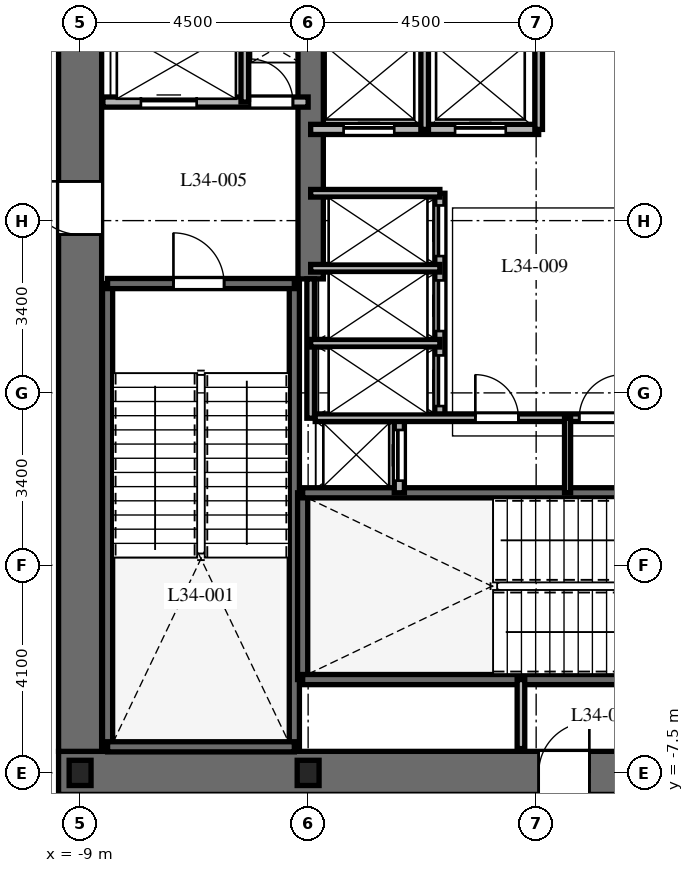
"""IFC4 building model, lengths in metres.
Left out: names, types, materials, properties, quantities, classifications, styles, units other than length and angle.
Written with IfcOpenShell. Run it as: python <this file> out.ifc"""

import sys

from ifc_helpers import new_model, si_unit, direction, frame, frame_2d, origin, origin_2d, place, context, subcontext, project, spatial, rectangle, i_section, extrude, element, fill, save


model = new_model("IFC4")
c1 = context("Model", 3, precision=1e-05, world=origin(), true_north=direction((0.0, 1.0)))
c2 = subcontext(c1, "Body", "Model", "MODEL_VIEW")
j1 = project(units=[si_unit("LENGTHUNIT", "METRE"), si_unit("PLANEANGLEUNIT", "RADIAN")], contexts=[c1])
p1 = place(None, origin())
s1 = spatial("IfcSite", under=j1, at=p1, CompositionType="ELEMENT")
p2 = place(p1, origin())
s2 = spatial("IfcBuilding", under=s1, at=p2, CompositionType="ELEMENT")
p3 = place(p2, frame((0.0, 0.0, 139.5)))
s3 = spatial("IfcBuildingStorey", under=s2, at=p3, CompositionType="ELEMENT", Elevation=139.5)
p4 = place(p3, frame((-9.425, -7.5, 0.0), z_axis=(0.0, 0.0, 1.0), x_axis=(1.0, 0.0, 0.0)))
e1 = element("IfcWall", 1, at=p4, inside=s3, PredefinedType="SHEAR", context=c2, shape_type="SweptSolid", body=[
    extrude(rectangle(XDim=18.85, YDim=0.85, at=frame_2d((9.425, 0.0))), origin(), (0.0, 0.0, 1.0), 4.8),
])
p5 = place(p4, frame((9.475, 0.0, 0.0)))
e2 = element("IfcOpeningElement", 2, at=p5, cuts=e1, PredefinedType="OPENING", context=c2, shape_type="SweptSolid", body=[
    extrude(rectangle(XDim=1.0, YDim=2.15, at=frame_2d((0.5, 1.075))), frame((0.0, 0.435, 0.0), z_axis=(0.0, -1.0, 0.0), x_axis=(1.0, 0.0, 0.0)), (0.0, 0.0, 1.0), 0.87),
])
p6 = place(p3, frame((-9.0, -7.075, 0.0), z_axis=(0.0, 0.0, 1.0), x_axis=(0.0, 1.0, 0.0)))
e3 = element("IfcWall", 3, at=p6, inside=s3, PredefinedType="SHEAR", context=c2, shape_type="SweptSolid", body=[
    extrude(rectangle(XDim=14.15, YDim=0.85, at=frame_2d((7.075, 0.0))), origin(), (0.0, 0.0, 1.0), 4.8),
])
p7 = place(p6, frame((10.2, 0.0, 0.0)))
e4 = element("IfcOpeningElement", 4, at=p7, cuts=e3, PredefinedType="OPENING", context=c2, shape_type="SweptSolid", body=[
    extrude(rectangle(XDim=1.05, YDim=2.15, at=frame_2d((0.525, 1.075))), frame((0.0, 0.435, 0.0), z_axis=(0.0, -1.0, 0.0), x_axis=(1.0, 0.0, 0.0)), (0.0, 0.0, 1.0), 0.87),
])
p8 = place(p3, frame((-4.45, 2.25, 0.0), z_axis=(0.0, 0.0, 1.0), x_axis=(0.0, 1.0, 0.0)))
e5 = element("IfcWall", 5, at=p8, inside=s3, PredefinedType="SHEAR", context=c2, shape_type="SweptSolid", body=[
    extrude(rectangle(XDim=4.825, YDim=0.5, at=frame_2d((2.413, 0.0))), origin(), (0.0, 0.0, 1.0), 4.8),
])
for number, where, z_axis, x_axis in (
    (6, (-8.458, -6.985, 0.0), (0.0, 0.0, 1.0), (0.0, 1.0, 0.0)),
    (7, (-4.772, -6.985, 0.0), (0.0, 0.0, 1.0), (0.0, 1.0, 0.0)),
):
    element("IfcWall", number, at=place(p3, frame(where, z_axis=z_axis, x_axis=x_axis)), inside=s3, PredefinedType="SHEAR", context=c2, shape_type="SweptSolid", body=[
        extrude(rectangle(XDim=9.143, YDim=0.2, at=frame_2d((4.572, 0.0))), origin(), (0.0, 0.0, 1.0), 4.8),
    ])
p9 = place(p3, frame((-8.458, -6.985, 0.0), z_axis=(0.0, 0.0, 1.0), x_axis=(1.0, 0.0, 0.0)))
e8 = element("IfcWall", 8, at=p9, inside=s3, PredefinedType="SHEAR", context=c2, shape_type="SweptSolid", body=[
    extrude(rectangle(XDim=3.686, YDim=0.2, at=frame_2d((1.843, 0.0))), origin(), (0.0, 0.0, 1.0), 4.8),
])
p10 = place(p3, frame((-8.458, 2.158, 0.0), z_axis=(0.0, 0.0, 1.0), x_axis=(1.0, 0.0, 0.0)))
e9 = element("IfcWall", 9, at=p10, inside=s3, PredefinedType="SHEAR", context=c2, shape_type="SweptSolid", body=[
    extrude(rectangle(XDim=3.686, YDim=0.2, at=frame_2d((1.843, 0.0))), origin(), (0.0, 0.0, 1.0), 4.8),
])
p11 = place(p10, frame((1.3, 0.0, 0.0)))
e10 = element("IfcOpeningElement", 10, at=p11, cuts=e9, PredefinedType="OPENING", context=c2, shape_type="SweptSolid", body=[
    extrude(rectangle(XDim=1.0, YDim=2.15, at=frame_2d((0.5, 1.075))), frame((0.0, 0.11, 0.0), z_axis=(0.0, -1.0, 0.0), x_axis=(1.0, 0.0, 0.0)), (0.0, 0.0, 1.0), 0.22),
])
p12 = place(p3, frame((-4.608, -5.658, 0.0), z_axis=(0.0, 0.0, 1.0), x_axis=(0.0, 1.0, 0.0)))
e11 = element("IfcWall", 11, at=p12, inside=s3, PredefinedType="SHEAR", context=c2, shape_type="SweptSolid", body=[
    extrude(rectangle(XDim=3.686, YDim=0.2, at=frame_2d((1.843, 0.0))), origin(), (0.0, 0.0, 1.0), 4.8),
])
p13 = place(p3, frame((-4.608, -5.658, 0.0), z_axis=(0.0, 0.0, 1.0), x_axis=(1.0, 0.0, 0.0)))
e12 = element("IfcWall", 12, at=p13, inside=s3, PredefinedType="SHEAR", context=c2, shape_type="SweptSolid", body=[
    extrude(rectangle(XDim=9.166, YDim=0.2, at=frame_2d((4.583, 0.0))), origin(), (0.0, 0.0, 1.0), 4.8),
])
p14 = place(p13, frame((7.45, 0.0, 0.0)))
e13 = element("IfcOpeningElement", 13, at=p14, cuts=e12, PredefinedType="OPENING", context=c2, shape_type="SweptSolid", body=[
    extrude(rectangle(XDim=1.0, YDim=2.15, at=frame_2d((0.5, 1.075))), frame((0.0, 0.11, 0.0), z_axis=(0.0, -1.0, 0.0), x_axis=(1.0, 0.0, 0.0)), (0.0, 0.0, 1.0), 0.22),
])
p15 = place(p3, frame((-4.608, -1.972, 0.0), z_axis=(0.0, 0.0, 1.0), x_axis=(1.0, 0.0, 0.0)))
e14 = element("IfcWall", 14, at=p15, inside=s3, PredefinedType="SHEAR", context=c2, shape_type="SweptSolid", body=[
    extrude(rectangle(XDim=9.166, YDim=0.2, at=frame_2d((4.583, 0.0))), origin(), (0.0, 0.0, 1.0), 4.8),
])
for number, where, z_axis, x_axis in (
    (15, (-9.0, -7.5, 0.0), (0.0, 0.0, 1.0), (1.0, 0.0, 0.0)),
    (16, (-4.5, -7.5, 0.0), (0.0, 0.0, 1.0), (1.0, 0.0, 0.0)),
):
    element("IfcColumn", number, at=place(p3, frame(where, z_axis=z_axis, x_axis=x_axis)), inside=s3, PredefinedType="COLUMN", context=c2, shape_type="SweptSolid", body=[
        extrude(i_section(OverallWidth=0.432, OverallDepth=0.498, WebThickness=0.056, FlangeThickness=0.089, at=origin_2d()), origin(), (0.0, 0.0, 1.0), 4.8),
    ])
p16 = place(p3, frame((-0.3, -7.02, 0.0), z_axis=(0.0, 0.0, 1.0), x_axis=(0.0, 1.0, 0.0)))
e17 = element("IfcWall", 17, at=p16, inside=s3, PredefinedType="PARTITIONING", context=c2, shape_type="SweptSolid", body=[
    extrude(rectangle(XDim=1.362, YDim=0.15, at=frame_2d((0.681, 0.0))), origin(), (0.0, 0.0, 1.0), 4.5),
])
p17 = place(p3, frame((-8.55, 5.74, 0.0), z_axis=(0.0, 0.0, 1.0), x_axis=(1.0, 0.0, 0.0)))
e18 = element("IfcWall", 18, at=p17, inside=s3, PredefinedType="PARTITIONING", context=c2, shape_type="SweptSolid", body=[
    extrude(rectangle(XDim=4.05, YDim=0.2, at=frame_2d((2.025, 0.0))), origin(), (0.0, 0.0, 1.0), 4.5),
])
p18 = place(p17, frame((0.75, 0.0, 0.0)))
e19 = element("IfcOpeningElement", 19, at=p18, cuts=e18, PredefinedType="OPENING", context=c2, shape_type="SweptSolid", body=[
    extrude(rectangle(XDim=1.1, YDim=2.2, at=frame_2d((0.55, 1.1))), frame((0.0, 0.11, 0.0), z_axis=(0.0, -1.0, 0.0), x_axis=(1.0, 0.0, 0.0)), (0.0, 0.0, 1.0), 0.22),
])
p19 = place(p17, frame((2.9, 0.0, 0.0)))
e20 = element("IfcOpeningElement", 20, at=p19, cuts=e18, PredefinedType="OPENING", context=c2, shape_type="SweptSolid", body=[
    extrude(rectangle(XDim=0.85, YDim=2.03, at=frame_2d((0.425, 1.015))), frame((0.0, 0.11, 0.0), z_axis=(0.0, -1.0, 0.0), x_axis=(1.0, 0.0, 0.0)), (0.0, 0.0, 1.0), 0.22),
])
p20 = place(p3, frame((-5.75, 5.74, 0.0), z_axis=(0.0, 0.0, 1.0), x_axis=(0.0, 1.0, 0.0)))
e21 = element("IfcWall", 21, at=p20, inside=s3, PredefinedType="PARTITIONING", context=c2, shape_type="SweptSolid", body=[
    extrude(rectangle(XDim=1.41, YDim=0.15, at=frame_2d((0.705, 0.0))), origin(), (0.0, 0.0, 1.0), 4.5),
])
p21 = place(p3, frame((-2.7, -1.972, 0.0), z_axis=(0.0, 0.0, 1.0), x_axis=(0.0, 1.0, 0.0)))
e22 = element("IfcWall", 22, at=p21, inside=s3, PredefinedType="PARTITIONING", context=c2, shape_type="SweptSolid", body=[
    extrude(rectangle(XDim=1.472, YDim=0.2, at=frame_2d((0.736, 0.0))), origin(), (0.0, 0.0, 1.0), 4.5),
])
p22 = place(p21, frame((0.24, 0.0, 0.0)))
e23 = element("IfcOpeningElement", 23, at=p22, cuts=e22, PredefinedType="OPENING", context=c2, shape_type="SweptSolid", body=[
    extrude(rectangle(XDim=1.0, YDim=2.2, at=frame_2d((0.5, 1.1))), frame((0.0, 0.11, 0.0), z_axis=(0.0, -1.0, 0.0), x_axis=(1.0, 0.0, 0.0)), (0.0, 0.0, 1.0), 0.22),
])
p23 = place(p3, frame((-4.45, 5.2, 0.0), z_axis=(0.0, 0.0, 1.0), x_axis=(1.0, 0.0, 0.0)))
e24 = element("IfcWall", 24, at=p23, inside=s3, PredefinedType="PARTITIONING", context=c2, shape_type="SweptSolid", body=[
    extrude(rectangle(XDim=4.5, YDim=0.2, at=frame_2d((2.25, 0.0))), origin(), (0.0, 0.0, 1.0), 4.5),
])
p24 = place(p23, frame((0.65, 0.0, 0.0)))
e25 = element("IfcOpeningElement", 25, at=p24, cuts=e24, PredefinedType="OPENING", context=c2, shape_type="SweptSolid", body=[
    extrude(rectangle(XDim=1.0, YDim=2.2, at=frame_2d((0.5, 1.1))), frame((0.0, 0.11, 0.0), z_axis=(0.0, -1.0, 0.0), x_axis=(1.0, 0.0, 0.0)), (0.0, 0.0, 1.0), 0.22),
])
p25 = place(p23, frame((2.85, 0.0, 0.0)))
e26 = element("IfcOpeningElement", 26, at=p25, cuts=e24, PredefinedType="OPENING", context=c2, shape_type="SweptSolid", body=[
    extrude(rectangle(XDim=1.0, YDim=2.2, at=frame_2d((0.5, 1.1))), frame((0.0, 0.11, 0.0), z_axis=(0.0, -1.0, 0.0), x_axis=(1.0, 0.0, 0.0)), (0.0, 0.0, 1.0), 0.22),
])
p26 = place(p3, frame((-2.2, 5.2, 0.0), z_axis=(0.0, 0.0, 1.0), x_axis=(0.0, 1.0, 0.0)))
e27 = element("IfcWall", 27, at=p26, inside=s3, PredefinedType="PARTITIONING", context=c2, shape_type="SweptSolid", body=[
    extrude(rectangle(XDim=1.85, YDim=0.15, at=frame_2d((0.925, 0.0))), origin(), (0.0, 0.0, 1.0), 4.5),
])
p27 = place(p3, frame((0.05, 5.2, 0.0), z_axis=(0.0, 0.0, 1.0), x_axis=(0.0, 1.0, 0.0)))
e28 = element("IfcWall", 28, at=p27, inside=s3, PredefinedType="PARTITIONING", context=c2, shape_type="SweptSolid", body=[
    extrude(rectangle(XDim=1.95, YDim=0.15, at=frame_2d((0.975, 0.0))), origin(), (0.0, 0.0, 1.0), 4.5),
])
p28 = place(p3, frame((-4.45, -0.5, 0.0), z_axis=(0.0, 0.0, 1.0), x_axis=(0.0, 1.0, 0.0)))
e29 = element("IfcWall", 29, at=p28, inside=s3, PredefinedType="PARTITIONING", context=c2, shape_type="SweptSolid", body=[
    extrude(rectangle(XDim=2.75, YDim=0.15, at=frame_2d((1.375, 0.0))), origin(), (0.0, 0.0, 1.0), 4.5),
])
p29 = place(p3, frame((-1.9, -0.5, 0.0), z_axis=(0.0, 0.0, 1.0), x_axis=(0.0, 1.0, 0.0)))
e30 = element("IfcWall", 30, at=p29, inside=s3, PredefinedType="PARTITIONING", context=c2, shape_type="SweptSolid", body=[
    extrude(rectangle(XDim=4.44, YDim=0.2, at=frame_2d((2.22, 0.0))), origin(), (0.0, 0.0, 1.0), 4.5),
])
p30 = place(p29, frame((0.24, 0.0, 0.0)))
e31 = element("IfcOpeningElement", 31, at=p30, cuts=e30, PredefinedType="OPENING", context=c2, shape_type="SweptSolid", body=[
    extrude(rectangle(XDim=1.0, YDim=2.2, at=frame_2d((0.5, 1.1))), frame((0.0, 0.11, 0.0), z_axis=(0.0, -1.0, 0.0), x_axis=(1.0, 0.0, 0.0)), (0.0, 0.0, 1.0), 0.22),
])
p31 = place(p29, frame((1.72, 0.0, 0.0)))
e32 = element("IfcOpeningElement", 32, at=p31, cuts=e30, PredefinedType="OPENING", context=c2, shape_type="SweptSolid", body=[
    extrude(rectangle(XDim=1.0, YDim=2.2, at=frame_2d((0.5, 1.1))), frame((0.0, 0.11, 0.0), z_axis=(0.0, -1.0, 0.0), x_axis=(1.0, 0.0, 0.0)), (0.0, 0.0, 1.0), 0.22),
])
p32 = place(p29, frame((3.2, 0.0, 0.0)))
e33 = element("IfcOpeningElement", 33, at=p32, cuts=e30, PredefinedType="OPENING", context=c2, shape_type="SweptSolid", body=[
    extrude(rectangle(XDim=1.0, YDim=2.2, at=frame_2d((0.5, 1.1))), frame((0.0, 0.11, 0.0), z_axis=(0.0, -1.0, 0.0), x_axis=(1.0, 0.0, 0.0)), (0.0, 0.0, 1.0), 0.22),
])
for number, where, z_axis, x_axis in (
    (34, (-4.45, 3.94, 0.0), (0.0, 0.0, 1.0), (1.0, 0.0, 0.0)),
    (35, (-4.45, 0.98, 0.0), (0.0, 0.0, 1.0), (1.0, 0.0, 0.0)),
    (36, (-4.45, 2.46, 0.0), (0.0, 0.0, 1.0), (1.0, 0.0, 0.0)),
):
    element("IfcWall", number, at=place(p3, frame(where, z_axis=z_axis, x_axis=x_axis)), inside=s3, PredefinedType="PARTITIONING", context=c2, shape_type="SweptSolid", body=[
        extrude(rectangle(XDim=2.55, YDim=0.15, at=frame_2d((1.275, 0.0))), origin(), (0.0, 0.0, 1.0), 4.5),
    ])
p33 = place(p3, frame((-4.36, -0.49, 0.0), z_axis=(0.0, 0.0, 1.0), x_axis=(1.0, 0.0, 0.0)))
e37 = element("IfcWall", 37, at=p33, inside=s3, PredefinedType="PARTITIONING", context=c2, shape_type="SweptSolid", body=[
    extrude(rectangle(XDim=8.72, YDim=0.15, at=frame_2d((4.36, 0.0))), origin(), (0.0, 0.0, 1.0), 4.5),
])
p34 = place(p33, frame((3.16, 0.0, 0.0)))
e38 = element("IfcOpeningElement", 38, at=p34, cuts=e37, PredefinedType="OPENING", context=c2, shape_type="SweptSolid", body=[
    extrude(rectangle(XDim=0.85, YDim=2.03, at=frame_2d((0.425, 1.015))), frame((0.0, 0.085, 0.0), z_axis=(0.0, -1.0, 0.0), x_axis=(1.0, 0.0, 0.0)), (0.0, 0.0, 1.0), 0.17),
])
p35 = place(p33, frame((5.21, 0.0, 0.0)))
e39 = element("IfcOpeningElement", 39, at=p35, cuts=e37, PredefinedType="OPENING", context=c2, shape_type="SweptSolid", body=[
    extrude(rectangle(XDim=0.85, YDim=2.03, at=frame_2d((0.425, 1.015))), frame((0.0, 0.085, 0.0), z_axis=(0.0, -1.0, 0.0), x_axis=(1.0, 0.0, 0.0)), (0.0, 0.0, 1.0), 0.17),
])
p36 = place(p3, frame((0.62, -1.972, 0.0), z_axis=(0.0, 0.0, 1.0), x_axis=(0.0, 1.0, 0.0)))
e40 = element("IfcWall", 40, at=p36, inside=s3, PredefinedType="PARTITIONING", context=c2, shape_type="SweptSolid", body=[
    extrude(rectangle(XDim=1.472, YDim=0.12, at=frame_2d((0.736, 0.0))), origin(), (0.0, 0.0, 1.0), 4.5),
])
p37 = place(p11, origin())
e41 = element("IfcDoor", 41, at=p37, inside=s3, OperationType="SINGLE_SWING_LEFT", PredefinedType="DOOR", context=c2, shape_type="SweptSolid", body=[
    extrude(rectangle(XDim=1.0, YDim=2.15, at=frame_2d((0.5, 1.075))), frame((0.0, 0.025, 0.0), z_axis=(0.0, -1.0, 0.0), x_axis=(1.0, 0.0, 0.0)), (0.0, 0.0, 1.0), 0.05),
])
fill(e10, e41)
p38 = place(p5, origin())
e42 = element("IfcDoor", 42, at=p38, inside=s3, OperationType="SINGLE_SWING_RIGHT", PredefinedType="DOOR", context=c2, shape_type="SweptSolid", body=[
    extrude(rectangle(XDim=1.0, YDim=2.15, at=frame_2d((0.5, 1.075))), frame((0.0, 0.025, 0.0), z_axis=(0.0, -1.0, 0.0), x_axis=(1.0, 0.0, 0.0)), (0.0, 0.0, 1.0), 0.05),
])
fill(e2, e42)
p39 = place(p7, origin())
e43 = element("IfcDoor", 43, at=p39, inside=s3, OperationType="SINGLE_SWING_RIGHT", PredefinedType="DOOR", context=c2, shape_type="SweptSolid", body=[
    extrude(rectangle(XDim=1.05, YDim=2.15, at=frame_2d((0.525, 1.075))), frame((0.0, 0.025, 0.0), z_axis=(0.0, -1.0, 0.0), x_axis=(1.0, 0.0, 0.0)), (0.0, 0.0, 1.0), 0.05),
])
fill(e4, e43)
p40 = place(p18, origin())
e44 = element("IfcDoor", 44, at=p40, inside=s3, OperationType="SLIDING_TO_LEFT", PredefinedType="DOOR", context=c2, shape_type="SweptSolid", body=[
    extrude(rectangle(XDim=1.1, YDim=2.2, at=frame_2d((0.55, 1.1))), frame((0.0, 0.025, 0.0), z_axis=(0.0, -1.0, 0.0), x_axis=(1.0, 0.0, 0.0)), (0.0, 0.0, 1.0), 0.05),
])
fill(e19, e44)
p41 = place(p19, origin())
e45 = element("IfcDoor", 45, at=p41, inside=s3, OperationType="SINGLE_SWING_LEFT", PredefinedType="DOOR", context=c2, shape_type="SweptSolid", body=[
    extrude(rectangle(XDim=0.85, YDim=2.03, at=frame_2d((0.425, 1.015))), frame((0.0, 0.025, 0.0), z_axis=(0.0, -1.0, 0.0), x_axis=(1.0, 0.0, 0.0)), (0.0, 0.0, 1.0), 0.05),
])
fill(e20, e45)
p42 = place(p22, origin())
e46 = element("IfcDoor", 46, at=p42, inside=s3, OperationType="SLIDING_TO_LEFT", PredefinedType="DOOR", context=c2, shape_type="SweptSolid", body=[
    extrude(rectangle(XDim=1.0, YDim=2.2, at=frame_2d((0.5, 1.1))), frame((0.0, 0.025, 0.0), z_axis=(0.0, -1.0, 0.0), x_axis=(1.0, 0.0, 0.0)), (0.0, 0.0, 1.0), 0.05),
])
fill(e23, e46)
p43 = place(p24, origin())
e47 = element("IfcDoor", 47, at=p43, inside=s3, OperationType="SLIDING_TO_LEFT", PredefinedType="DOOR", context=c2, shape_type="SweptSolid", body=[
    extrude(rectangle(XDim=1.0, YDim=2.2, at=frame_2d((0.5, 1.1))), frame((0.0, 0.025, 0.0), z_axis=(0.0, -1.0, 0.0), x_axis=(1.0, 0.0, 0.0)), (0.0, 0.0, 1.0), 0.05),
])
fill(e25, e47)
p44 = place(p25, origin())
e48 = element("IfcDoor", 48, at=p44, inside=s3, OperationType="SLIDING_TO_RIGHT", PredefinedType="DOOR", context=c2, shape_type="SweptSolid", body=[
    extrude(rectangle(XDim=1.0, YDim=2.2, at=frame_2d((0.5, 1.1))), frame((0.0, 0.025, 0.0), z_axis=(0.0, -1.0, 0.0), x_axis=(1.0, 0.0, 0.0)), (0.0, 0.0, 1.0), 0.05),
])
fill(e26, e48)
p45 = place(p30, origin())
e49 = element("IfcDoor", 49, at=p45, inside=s3, OperationType="SLIDING_TO_LEFT", PredefinedType="DOOR", context=c2, shape_type="SweptSolid", body=[
    extrude(rectangle(XDim=1.0, YDim=2.2, at=frame_2d((0.5, 1.1))), frame((0.0, 0.025, 0.0), z_axis=(0.0, -1.0, 0.0), x_axis=(1.0, 0.0, 0.0)), (0.0, 0.0, 1.0), 0.05),
])
fill(e31, e49)
p46 = place(p31, origin())
e50 = element("IfcDoor", 50, at=p46, inside=s3, OperationType="SLIDING_TO_LEFT", PredefinedType="DOOR", context=c2, shape_type="SweptSolid", body=[
    extrude(rectangle(XDim=1.0, YDim=2.2, at=frame_2d((0.5, 1.1))), frame((0.0, 0.025, 0.0), z_axis=(0.0, -1.0, 0.0), x_axis=(1.0, 0.0, 0.0)), (0.0, 0.0, 1.0), 0.05),
])
fill(e32, e50)
p47 = place(p32, origin())
e51 = element("IfcDoor", 51, at=p47, inside=s3, OperationType="SLIDING_TO_LEFT", PredefinedType="DOOR", context=c2, shape_type="SweptSolid", body=[
    extrude(rectangle(XDim=1.0, YDim=2.2, at=frame_2d((0.5, 1.1))), frame((0.0, 0.025, 0.0), z_axis=(0.0, -1.0, 0.0), x_axis=(1.0, 0.0, 0.0)), (0.0, 0.0, 1.0), 0.05),
])
fill(e33, e51)
p48 = place(p34, origin())
e52 = element("IfcDoor", 52, at=p48, inside=s3, OperationType="SINGLE_SWING_LEFT", PredefinedType="DOOR", context=c2, shape_type="SweptSolid", body=[
    extrude(rectangle(XDim=0.85, YDim=2.03, at=frame_2d((0.425, 1.015))), frame((0.0, 0.025, 0.0), z_axis=(0.0, -1.0, 0.0), x_axis=(1.0, 0.0, 0.0)), (0.0, 0.0, 1.0), 0.05),
])
fill(e38, e52)
p49 = place(p35, origin())
e53 = element("IfcDoor", 53, at=p49, inside=s3, OperationType="SINGLE_SWING_RIGHT", PredefinedType="DOOR", context=c2, shape_type="SweptSolid", body=[
    extrude(rectangle(XDim=0.85, YDim=2.03, at=frame_2d((0.425, 1.015))), frame((0.0, 0.025, 0.0), z_axis=(0.0, -1.0, 0.0), x_axis=(1.0, 0.0, 0.0)), (0.0, 0.0, 1.0), 0.05),
])
fill(e39, e53)
save(model, sys.argv[1])
